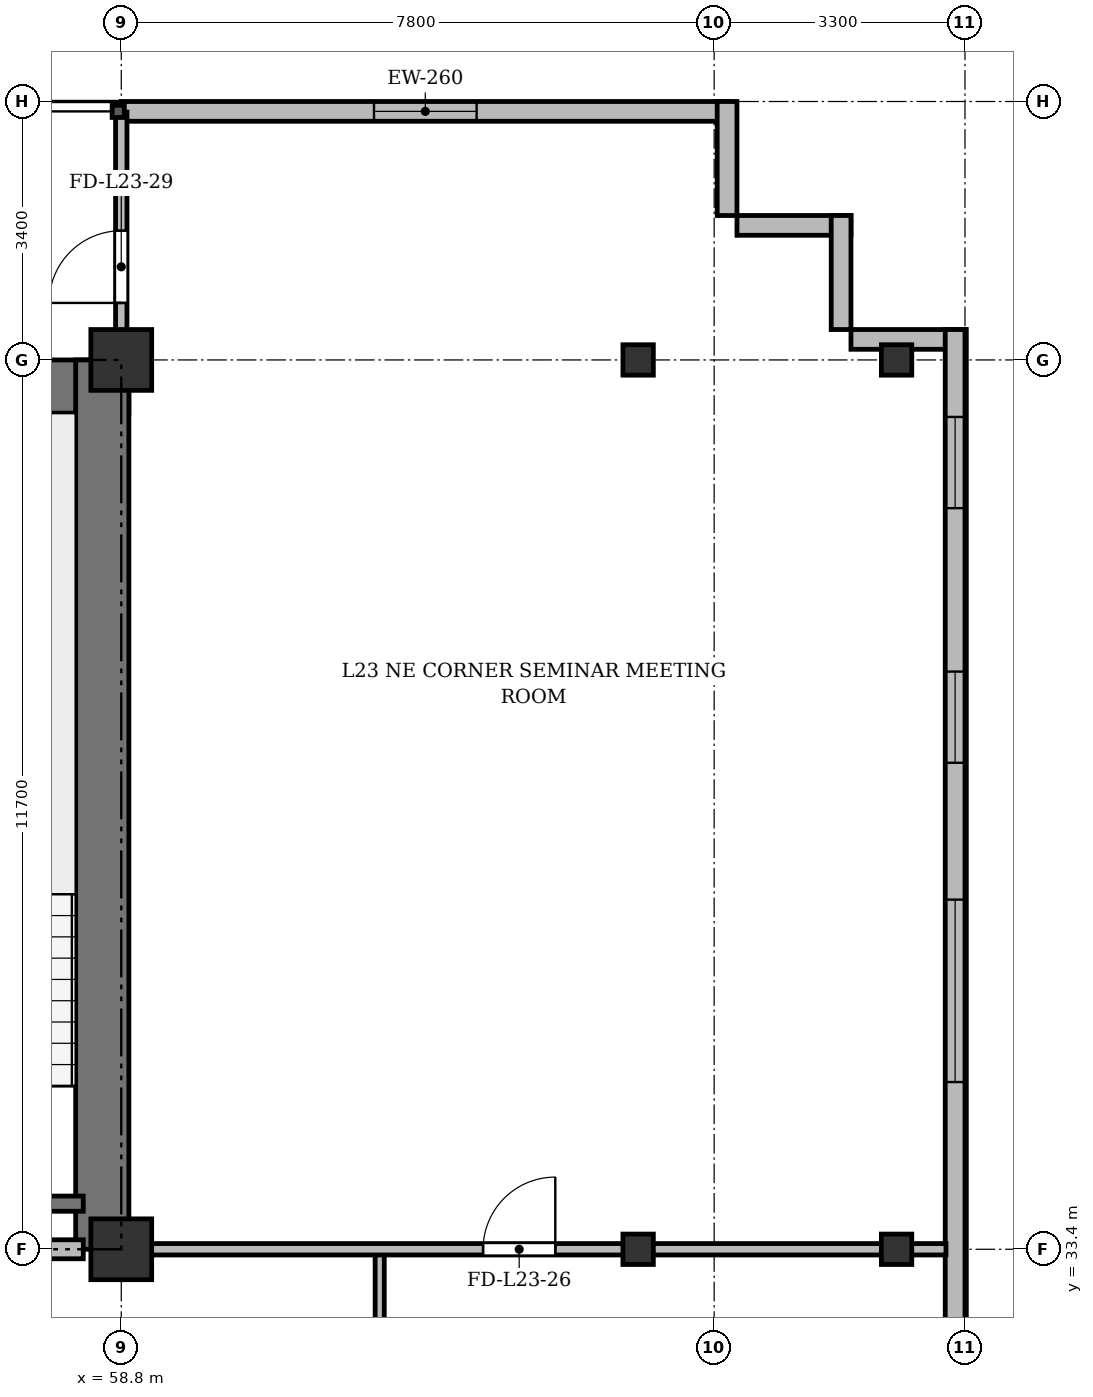
"""IFC4 building model, lengths in metres.
Left out: names, types, materials, properties, quantities, classifications, styles, units other than length and angle.
Written with IfcOpenShell. Run it as: python <this file> out.ifc"""

import sys

from ifc_helpers import new_model, si_unit, direction, frame, frame_2d, origin, origin_2d, place, context, subcontext, project, spatial, rectangle, i_section, extrude, source, transform, mapped, element, fill, save


model = new_model("IFC4")
c1 = context("Model", 3, precision=1e-05, world=origin(), true_north=direction((0.0, 1.0)))
c2 = subcontext(c1, "Body", "Model", "MODEL_VIEW")
j1 = project(units=[si_unit("LENGTHUNIT", "METRE"), si_unit("PLANEANGLEUNIT", "RADIAN")], contexts=[c1])
p1 = place(None, origin())
s1 = spatial("IfcSite", under=j1, at=p1, CompositionType="ELEMENT")
p2 = place(p1, origin())
s2 = spatial("IfcBuilding", under=s1, at=p2, CompositionType="ELEMENT")
p3 = place(p2, frame((0.0, 0.0, 92.5)))
s3 = spatial("IfcBuildingStorey", under=s2, at=p3, CompositionType="ELEMENT", Elevation=92.5)
m1 = source(origin(), c2, "Body", "SweptSolid", [
    extrude(rectangle(XDim=0.8, YDim=0.8, at=origin_2d()), origin(), (0.0, 0.0, 1.0), 3.6),
])
for number, where, z_axis, x_axis in (
    (1, (58.8, 33.4, 0.0), (0.0, 0.0, 1.0), (1.0, 0.0, 0.0)),
    (2, (58.8, 45.1, 0.0), (0.0, 0.0, 1.0), (1.0, 0.0, 0.0)),
):
    element("IfcColumn", number, at=place(p3, frame(where, z_axis=z_axis, x_axis=x_axis)), inside=s3, PredefinedType="COLUMN", context=c2, shape_type="MappedRepresentation", body=[
        mapped(m1, transform((0.0, 0.0, 0.0), x_axis=(1.0, 0.0, 0.0), y_axis=(0.0, 1.0, 0.0), z_axis=(0.0, 0.0, 1.0), scale=1.0)),
    ])
m2 = source(origin(), c2, "Body", "SweptSolid", [
    extrude(i_section(OverallWidth=0.4, OverallDepth=0.4, WebThickness=0.022, FlangeThickness=0.035, at=origin_2d()), origin(), (0.0, 0.0, 1.0), 3.6),
])
for number, where, z_axis, x_axis in (
    (3, (65.6, 33.4, 0.0), (0.0, 0.0, 1.0), (1.0, 0.0, 0.0)),
    (4, (65.6, 45.1, 0.0), (0.0, 0.0, 1.0), (1.0, 0.0, 0.0)),
    (5, (69.0, 33.4, 0.0), (0.0, 0.0, 1.0), (1.0, 0.0, 0.0)),
    (6, (69.0, 45.1, 0.0), (0.0, 0.0, 1.0), (1.0, 0.0, 0.0)),
):
    element("IfcColumn", number, at=place(p3, frame(where, z_axis=z_axis, x_axis=x_axis)), inside=s3, PredefinedType="COLUMN", context=c2, shape_type="MappedRepresentation", body=[
        mapped(m2, transform((0.0, 0.0, 0.0), x_axis=(1.0, 0.0, 0.0), y_axis=(0.0, 1.0, 0.0), z_axis=(0.0, 0.0, 1.0), scale=1.0)),
    ])
p4 = place(p3, frame((58.8, 48.37, 0.0), z_axis=(0.0, 0.0, 1.0), x_axis=(1.0, 0.0, 0.0)))
e7 = element("IfcWall", 7, at=p4, inside=s3, PredefinedType="SOLIDWALL", context=c2, shape_type="SweptSolid", body=[
    extrude(rectangle(XDim=8.0, YDim=0.26, at=frame_2d((4.0, 0.0))), origin(), (0.0, 0.0, 1.0), 3.34),
])
p5 = place(p4, frame((3.325, 0.0, 0.9)))
e8 = element("IfcOpeningElement", 8, at=p5, cuts=e7, PredefinedType="OPENING", context=c2, shape_type="SweptSolid", body=[
    extrude(rectangle(XDim=1.35, YDim=1.5, at=frame_2d((0.675, 0.75))), frame((0.0, 0.14, 0.0), z_axis=(0.0, -1.0, 0.0), x_axis=(1.0, 0.0, 0.0)), (0.0, 0.0, 1.0), 0.28),
])
for number, where, z_axis, x_axis in (
    (9, (66.77, 48.5, 0.0), (0.0, 0.0, 1.0), (0.0, -1.0, 0.0)),
    (10, (66.9, 46.87, 0.0), (0.0, 0.0, 1.0), (1.0, 0.0, 0.0)),
    (11, (68.27, 47.0, 0.0), (0.0, 0.0, 1.0), (0.0, -1.0, 0.0)),
):
    element("IfcWall", number, at=place(p3, frame(where, z_axis=z_axis, x_axis=x_axis)), inside=s3, PredefinedType="SOLIDWALL", context=c2, shape_type="SweptSolid", body=[
        extrude(rectangle(XDim=1.5, YDim=0.26, at=frame_2d((0.75, 0.0))), origin(), (0.0, 0.0, 1.0), 3.34),
    ])
p6 = place(p3, frame((68.4, 45.37, 0.0), z_axis=(0.0, 0.0, 1.0), x_axis=(1.0, 0.0, 0.0)))
e12 = element("IfcWall", 12, at=p6, inside=s3, PredefinedType="SOLIDWALL", context=c2, shape_type="SweptSolid", body=[
    extrude(rectangle(XDim=1.5, YDim=0.26, at=frame_2d((0.75, 0.0))), origin(), (0.0, 0.0, 1.0), 2.752),
])
p7 = place(p3, frame((69.77, 45.5, 0.0), z_axis=(0.0, 0.0, 1.0), x_axis=(0.0, -1.0, 0.0)))
e13 = element("IfcWall", 13, at=p7, inside=s3, PredefinedType="SOLIDWALL", context=c2, shape_type="SweptSolid", body=[
    extrude(rectangle(XDim=39.6, YDim=0.26, at=frame_2d((19.8, 0.0))), origin(), (0.0, 0.0, 1.0), 3.34),
])
p8 = place(p7, frame((36.95, 0.0, 0.92)))
e14 = element("IfcOpeningElement", 14, at=p8, cuts=e13, PredefinedType="OPENING", context=c2, shape_type="SweptSolid", body=[
    extrude(rectangle(XDim=1.2, YDim=1.65, at=frame_2d((0.6, 0.825))), frame((0.0, 0.14, 0.0), z_axis=(0.0, -1.0, 0.0), x_axis=(1.0, 0.0, 0.0)), (0.0, 0.0, 1.0), 0.28),
])
p9 = place(p7, frame((32.9, 0.0, 0.92)))
e15 = element("IfcOpeningElement", 15, at=p9, cuts=e13, PredefinedType="OPENING", context=c2, shape_type="SweptSolid", body=[
    extrude(rectangle(XDim=2.4, YDim=2.1, at=frame_2d((1.2, 1.05))), frame((0.0, 0.14, 0.0), z_axis=(0.0, -1.0, 0.0), x_axis=(1.0, 0.0, 0.0)), (0.0, 0.0, 1.0), 0.28),
])
p10 = place(p7, frame((28.7, 0.0, 0.92)))
e16 = element("IfcOpeningElement", 16, at=p10, cuts=e13, PredefinedType="OPENING", context=c2, shape_type="SweptSolid", body=[
    extrude(rectangle(XDim=2.4, YDim=2.1, at=frame_2d((1.2, 1.05))), frame((0.0, 0.14, 0.0), z_axis=(0.0, -1.0, 0.0), x_axis=(1.0, 0.0, 0.0)), (0.0, 0.0, 1.0), 0.28),
])
p11 = place(p7, frame((21.5, 0.0, 0.92)))
e17 = element("IfcOpeningElement", 17, at=p11, cuts=e13, PredefinedType="OPENING", context=c2, shape_type="SweptSolid", body=[
    extrude(rectangle(XDim=2.4, YDim=2.1, at=frame_2d((1.2, 1.05))), frame((0.0, 0.14, 0.0), z_axis=(0.0, -1.0, 0.0), x_axis=(1.0, 0.0, 0.0)), (0.0, 0.0, 1.0), 0.28),
])
p12 = place(p7, frame((7.5, 0.0, 0.92)))
e18 = element("IfcOpeningElement", 18, at=p12, cuts=e13, PredefinedType="OPENING", context=c2, shape_type="SweptSolid", body=[
    extrude(rectangle(XDim=2.4, YDim=2.1, at=frame_2d((1.2, 1.05))), frame((0.0, 0.14, 0.0), z_axis=(0.0, -1.0, 0.0), x_axis=(1.0, 0.0, 0.0)), (0.0, 0.0, 1.0), 0.28),
])
p13 = place(p7, frame((4.5, 0.0, 0.92)))
e19 = element("IfcOpeningElement", 19, at=p13, cuts=e13, PredefinedType="OPENING", context=c2, shape_type="SweptSolid", body=[
    extrude(rectangle(XDim=1.2, YDim=1.65, at=frame_2d((0.6, 0.825))), frame((0.0, 0.14, 0.0), z_axis=(0.0, -1.0, 0.0), x_axis=(1.0, 0.0, 0.0)), (0.0, 0.0, 1.0), 0.28),
])
p14 = place(p7, frame((1.15, 0.0, 0.92)))
e20 = element("IfcOpeningElement", 20, at=p14, cuts=e13, PredefinedType="OPENING", context=c2, shape_type="SweptSolid", body=[
    extrude(rectangle(XDim=1.2, YDim=1.65, at=frame_2d((0.6, 0.825))), frame((0.0, 0.14, 0.0), z_axis=(0.0, -1.0, 0.0), x_axis=(1.0, 0.0, 0.0)), (0.0, 0.0, 1.0), 0.28),
])
p15 = place(p3, frame((15.5, 44.75, 0.0), z_axis=(0.0, 0.0, 1.0), x_axis=(1.0, 0.0, 0.0)))
e21 = element("IfcWall", 21, at=p15, inside=s3, PredefinedType="SHEAR", context=c2, shape_type="SweptSolid", body=[
    extrude(rectangle(XDim=43.4, YDim=0.7, at=frame_2d((21.7, 0.0))), origin(), (0.0, 0.0, 1.0), 3.34),
])
p16 = place(p3, frame((58.55, 33.4, 0.0), z_axis=(0.0, 0.0, 1.0), x_axis=(0.0, 1.0, 0.0)))
e22 = element("IfcWall", 22, at=p16, inside=s3, PredefinedType="SHEAR", context=c2, shape_type="SweptSolid", body=[
    extrude(rectangle(XDim=11.7, YDim=0.7, at=frame_2d((5.85, 0.0))), origin(), (0.0, 0.0, 1.0), 3.34),
])
p17 = place(p3, frame((54.9, 34.0, 0.0), z_axis=(0.0, 0.0, 1.0), x_axis=(1.0, 0.0, 0.0)))
e23 = element("IfcWall", 23, at=p17, inside=s3, PredefinedType="SHEAR", context=c2, shape_type="SweptSolid", body=[
    extrude(rectangle(XDim=3.4, YDim=0.2, at=frame_2d((1.7, 0.0))), origin(), (0.0, 0.0, 1.0), 3.34),
])
p18 = place(p3, frame((47.15, 33.4, 0.0), z_axis=(0.0, 0.0, 1.0), x_axis=(1.0, 0.0, 0.0)))
e24 = element("IfcWall", 24, at=p18, inside=s3, PredefinedType="PARTITIONING", context=c2, shape_type="SweptSolid", body=[
    extrude(rectangle(XDim=11.15, YDim=0.25, at=frame_2d((5.575, 0.0))), origin(), (0.0, 0.0, 1.0), 2.752),
])
p19 = place(p18, frame((0.7, 0.0, 0.0)))
e25 = element("IfcOpeningElement", 25, at=p19, cuts=e24, PredefinedType="OPENING", context=c2, shape_type="SweptSolid", body=[
    extrude(rectangle(XDim=0.95, YDim=2.15, at=frame_2d((0.475, 1.075))), frame((0.0, 0.135, 0.0), z_axis=(0.0, -1.0, 0.0), x_axis=(1.0, 0.0, 0.0)), (0.0, 0.0, 1.0), 0.27),
])
p20 = place(p18, frame((6.0, 0.0, 0.0)))
e26 = element("IfcOpeningElement", 26, at=p20, cuts=e24, PredefinedType="OPENING", context=c2, shape_type="SweptSolid", body=[
    extrude(rectangle(XDim=1.2, YDim=2.15, at=frame_2d((0.6, 1.075))), frame((0.0, 0.135, 0.0), z_axis=(0.0, -1.0, 0.0), x_axis=(1.0, 0.0, 0.0)), (0.0, 0.0, 1.0), 0.27),
])
p21 = place(p3, frame((62.2, 29.8, 0.0), z_axis=(0.0, 0.0, 1.0), x_axis=(0.0, 1.0, 0.0)))
e27 = element("IfcWall", 27, at=p21, inside=s3, PredefinedType="PARTITIONING", context=c2, shape_type="SweptSolid", body=[
    extrude(rectangle(XDim=3.6, YDim=0.12, at=frame_2d((1.8, 0.0))), origin(), (0.0, 0.0, 1.0), 2.752),
])
p22 = place(p3, frame((58.8, 33.4, 0.0), z_axis=(0.0, 0.0, 1.0), x_axis=(1.0, 0.0, 0.0)))
e28 = element("IfcWall", 28, at=p22, inside=s3, PredefinedType="PARTITIONING", context=c2, shape_type="SweptSolid", body=[
    extrude(rectangle(XDim=10.85, YDim=0.15, at=frame_2d((5.425, 0.0))), origin(), (0.0, 0.0, 1.0), 2.752),
])
p23 = place(p22, frame((4.76, 0.0, 0.0)))
e29 = element("IfcOpeningElement", 29, at=p23, cuts=e28, PredefinedType="OPENING", context=c2, shape_type="SweptSolid", body=[
    extrude(rectangle(XDim=0.95, YDim=2.15, at=frame_2d((0.475, 1.075))), frame((0.0, 0.085, 0.0), z_axis=(0.0, -1.0, 0.0), x_axis=(1.0, 0.0, 0.0)), (0.0, 0.0, 1.0), 0.17),
])
p24 = place(p3, frame((58.8, 44.75, 0.0), z_axis=(0.0, 0.0, 1.0), x_axis=(0.0, 1.0, 0.0)))
e30 = element("IfcWall", 30, at=p24, inside=s3, PredefinedType="PARTITIONING", context=c2, shape_type="SweptSolid", body=[
    extrude(rectangle(XDim=3.61, YDim=0.15, at=frame_2d((1.805, 0.0))), origin(), (0.0, 0.0, 1.0), 2.84),
])
p25 = place(p24, frame((1.1, 0.0, 0.0)))
e31 = element("IfcOpeningElement", 31, at=p25, cuts=e30, PredefinedType="OPENING", context=c2, shape_type="SweptSolid", body=[
    extrude(rectangle(XDim=0.95, YDim=2.15, at=frame_2d((0.475, 1.075))), frame((0.0, 0.085, 0.0), z_axis=(0.0, -1.0, 0.0), x_axis=(1.0, 0.0, 0.0)), (0.0, 0.0, 1.0), 0.17),
])
m3 = source(origin(), c2, "Body", "SweptSolid", [
    extrude(rectangle(XDim=1.35, YDim=1.5, at=frame_2d((0.675, 0.75))), frame((0.0, 0.03, 0.0), z_axis=(0.0, -1.0, 0.0), x_axis=(1.0, 0.0, 0.0)), (0.0, 0.0, 1.0), 0.06),
])
p26 = place(p5, origin())
e32 = element("IfcWindow", 32, at=p26, inside=s3, PartitioningType="SINGLE_PANEL", PredefinedType="WINDOW", context=c2, shape_type="MappedRepresentation", body=[
    mapped(m3, transform((0.0, 0.0, 0.0), x_axis=(1.0, 0.0, 0.0), y_axis=(0.0, 1.0, 0.0), z_axis=(0.0, 0.0, 1.0), scale=1.0)),
])
fill(e8, e32)
m4 = source(origin(), c2, "Body", "SweptSolid", [
    extrude(rectangle(XDim=2.4, YDim=2.1, at=frame_2d((1.2, 1.05))), frame((0.0, 0.03, 0.0), z_axis=(0.0, -1.0, 0.0), x_axis=(1.0, 0.0, 0.0)), (0.0, 0.0, 1.0), 0.06),
])
p27 = place(p12, origin())
e33 = element("IfcWindow", 33, at=p27, inside=s3, PartitioningType="SINGLE_PANEL", PredefinedType="WINDOW", context=c2, shape_type="MappedRepresentation", body=[
    mapped(m4, transform((0.0, 0.0, 0.0), x_axis=(1.0, 0.0, 0.0), y_axis=(0.0, 1.0, 0.0), z_axis=(0.0, 0.0, 1.0), scale=1.0)),
])
fill(e18, e33)
m5 = source(origin(), c2, "Body", "SweptSolid", [
    extrude(rectangle(XDim=1.2, YDim=1.65, at=frame_2d((0.6, 0.825))), frame((0.0, 0.03, 0.0), z_axis=(0.0, -1.0, 0.0), x_axis=(1.0, 0.0, 0.0)), (0.0, 0.0, 1.0), 0.06),
])
p28 = place(p13, origin())
e34 = element("IfcWindow", 34, at=p28, inside=s3, PartitioningType="SINGLE_PANEL", PredefinedType="WINDOW", context=c2, shape_type="MappedRepresentation", body=[
    mapped(m5, transform((0.0, 0.0, 0.0), x_axis=(1.0, 0.0, 0.0), y_axis=(0.0, 1.0, 0.0), z_axis=(0.0, 0.0, 1.0), scale=1.0)),
])
fill(e19, e34)
p29 = place(p14, origin())
e35 = element("IfcWindow", 35, at=p29, inside=s3, PartitioningType="SINGLE_PANEL", PredefinedType="WINDOW", context=c2, shape_type="MappedRepresentation", body=[
    mapped(m5, transform((0.0, 0.0, 0.0), x_axis=(1.0, 0.0, 0.0), y_axis=(0.0, 1.0, 0.0), z_axis=(0.0, 0.0, 1.0), scale=1.0)),
])
fill(e20, e35)
m6 = source(origin(), c2, "Body", "SweptSolid", [
    extrude(rectangle(XDim=0.95, YDim=2.15, at=frame_2d((0.475, 1.075))), frame((0.0, 0.025, 0.0), z_axis=(0.0, -1.0, 0.0), x_axis=(1.0, 0.0, 0.0)), (0.0, 0.0, 1.0), 0.05),
])
p30 = place(p23, origin())
e36 = element("IfcDoor", 36, at=p30, inside=s3, OperationType="SINGLE_SWING_RIGHT", PredefinedType="DOOR", context=c2, shape_type="MappedRepresentation", body=[
    mapped(m6, transform((0.0, 0.0, 0.0), x_axis=(1.0, 0.0, 0.0), y_axis=(0.0, 1.0, 0.0), z_axis=(0.0, 0.0, 1.0), scale=1.0)),
])
fill(e29, e36)
p31 = place(p25, origin())
e37 = element("IfcDoor", 37, at=p31, inside=s3, OperationType="SINGLE_SWING_LEFT", PredefinedType="DOOR", context=c2, shape_type="MappedRepresentation", body=[
    mapped(m6, transform((0.0, 0.0, 0.0), x_axis=(1.0, 0.0, 0.0), y_axis=(0.0, 1.0, 0.0), z_axis=(0.0, 0.0, 1.0), scale=1.0)),
])
fill(e31, e37)
save(model, sys.argv[1])
